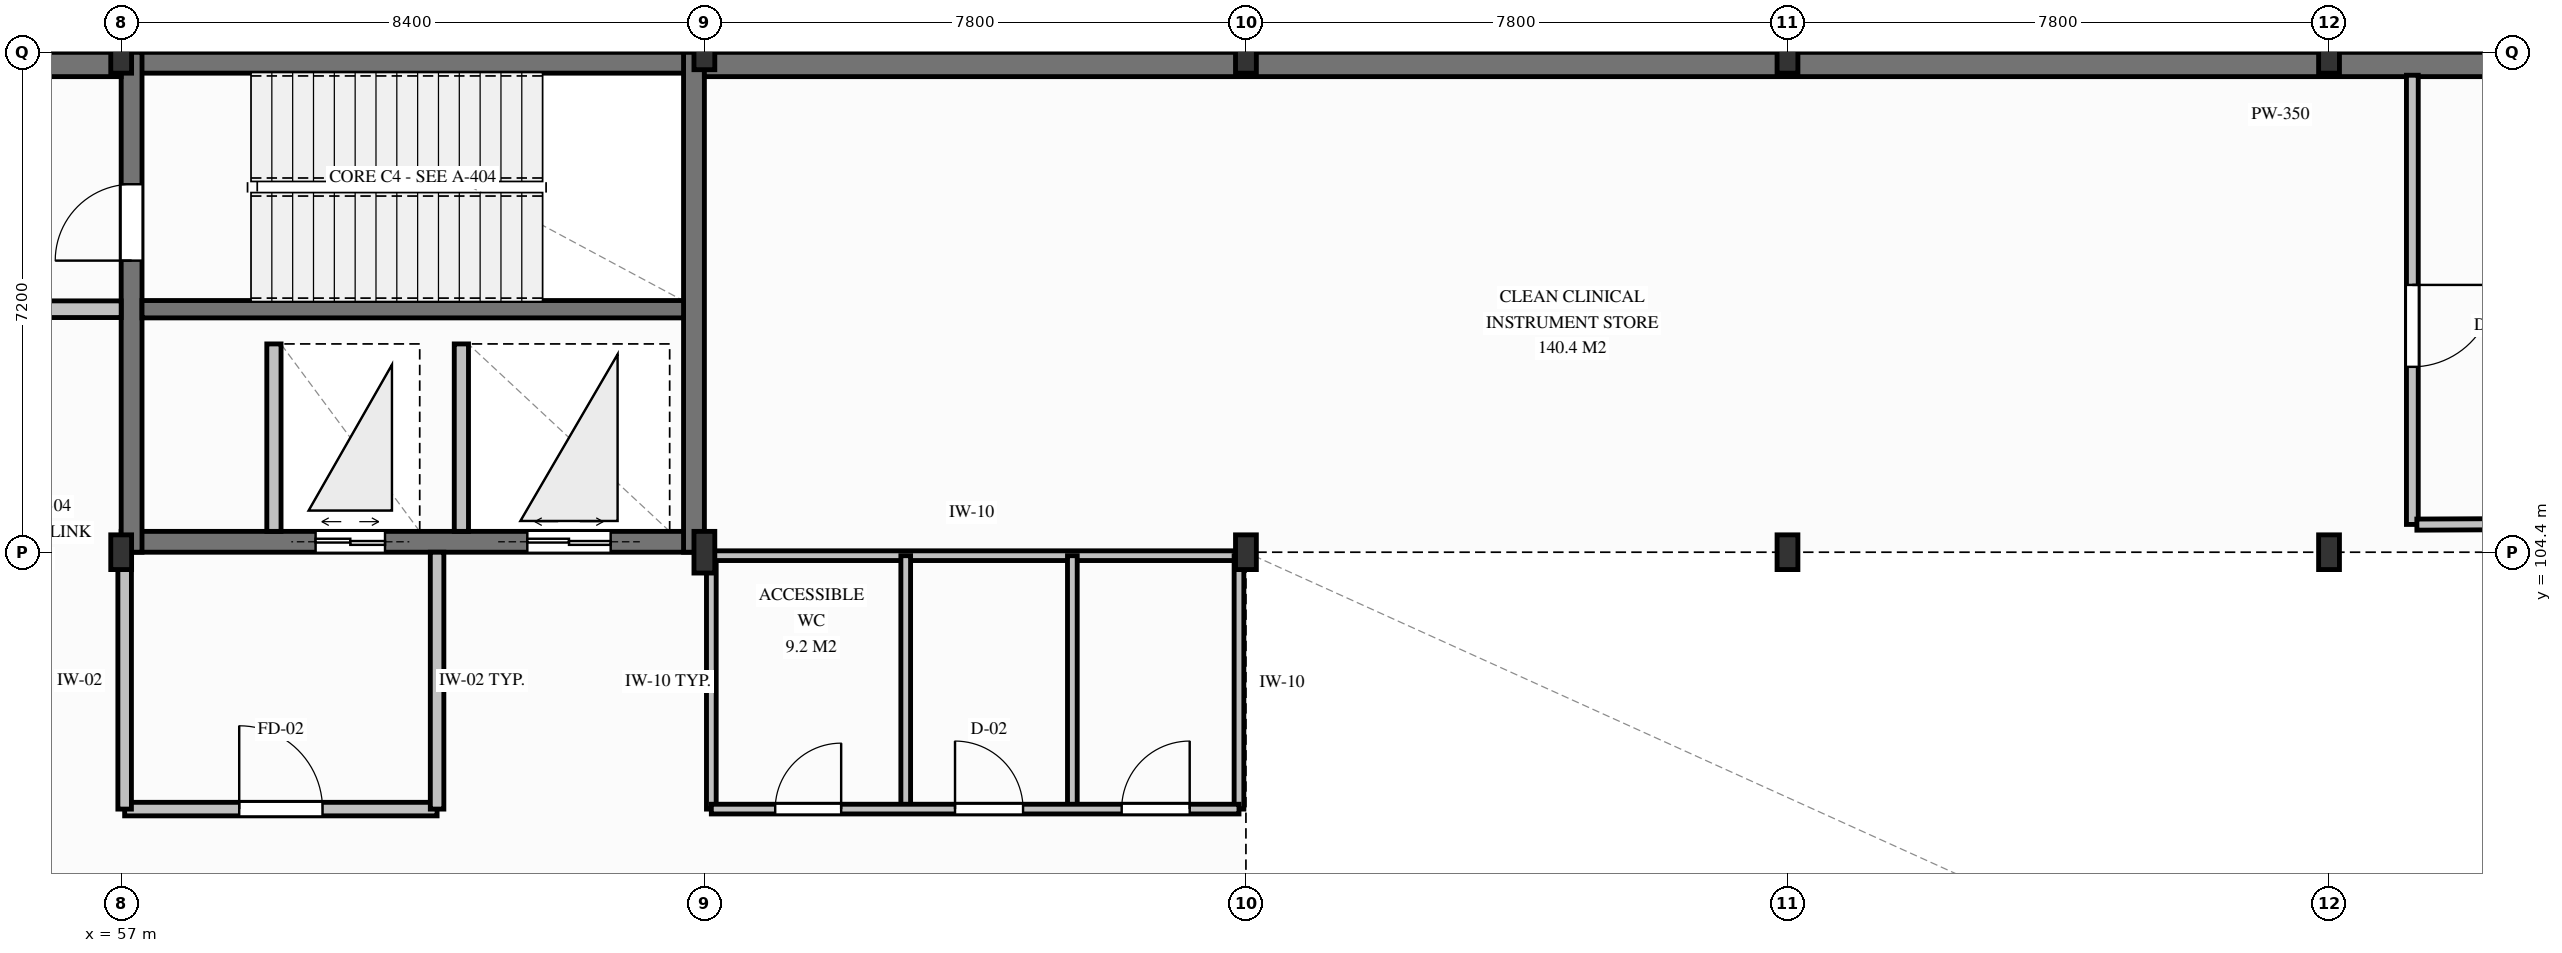
"""IFC4 building model, lengths in metres.
Left out: names, types, materials, properties, quantities, classifications, styles, units other than length and angle.
Written with IfcOpenShell. Run it as: python <this file> out.ifc"""

import sys

from ifc_helpers import new_model, si_unit, direction, frame, frame_2d, origin, origin_2d, place, context, subcontext, project, spatial, rectangle, i_section, extrude, element, fill, save


model = new_model("IFC4")
c1 = context("Model", 3, precision=1e-05, world=origin(), true_north=direction((0.0, 1.0)))
c2 = subcontext(c1, "Body", "Model", "MODEL_VIEW")
j1 = project(units=[si_unit("LENGTHUNIT", "METRE"), si_unit("PLANEANGLEUNIT", "RADIAN")], contexts=[c1])
p1 = place(None, origin())
s1 = spatial("IfcSite", under=j1, at=p1, CompositionType="ELEMENT")
p2 = place(p1, origin())
s2 = spatial("IfcBuilding", under=s1, at=p2, CompositionType="ELEMENT")
p3 = place(p2, origin())
s3 = spatial("IfcBuildingStorey", under=s2, at=p3, CompositionType="ELEMENT", Elevation=0.0)
p4 = place(p3, frame((57.0, 111.45, 0.0), z_axis=(0.0, 0.0, 1.0), x_axis=(1.0, 0.0, 0.0)))
e1 = element("IfcWall", 1, at=p4, inside=s3, PredefinedType="SHEAR", context=c2, shape_type="SweptSolid", body=[
    extrude(rectangle(XDim=8.4, YDim=0.3, at=frame_2d((4.2, 0.0))), origin(), (0.0, 0.0, 1.0), 4.5),
])
p5 = place(p3, frame((57.0, 104.55, 0.0), z_axis=(0.0, 0.0, 1.0), x_axis=(1.0, 0.0, 0.0)))
e2 = element("IfcWall", 2, at=p5, inside=s3, PredefinedType="SHEAR", context=c2, shape_type="SweptSolid", body=[
    extrude(rectangle(XDim=8.4, YDim=0.3, at=frame_2d((4.2, 0.0))), origin(), (0.0, 0.0, 1.0), 4.5),
])
p6 = place(p5, frame((2.8, 0.0, 0.0)))
e3 = element("IfcOpeningElement", 3, at=p6, cuts=e2, PredefinedType="OPENING", context=c2, shape_type="SweptSolid", body=[
    extrude(rectangle(XDim=1.0, YDim=2.1, at=frame_2d((0.5, 1.05))), frame((0.0, 0.16, 0.0), z_axis=(0.0, -1.0, 0.0), x_axis=(1.0, 0.0, 0.0)), (0.0, 0.0, 1.0), 0.32),
])
p7 = place(p5, frame((5.85, 0.0, 0.0)))
e4 = element("IfcOpeningElement", 4, at=p7, cuts=e2, PredefinedType="OPENING", context=c2, shape_type="SweptSolid", body=[
    extrude(rectangle(XDim=1.2, YDim=2.15, at=frame_2d((0.6, 1.075))), frame((0.0, 0.16, 0.0), z_axis=(0.0, -1.0, 0.0), x_axis=(1.0, 0.0, 0.0)), (0.0, 0.0, 1.0), 0.32),
])
p8 = place(p3, frame((57.15, 104.4, 0.0), z_axis=(0.0, 0.0, 1.0), x_axis=(0.0, 1.0, 0.0)))
e5 = element("IfcWall", 5, at=p8, inside=s3, PredefinedType="SHEAR", context=c2, shape_type="SweptSolid", body=[
    extrude(rectangle(XDim=7.2, YDim=0.3, at=frame_2d((3.6, 0.0))), origin(), (0.0, 0.0, 1.0), 4.5),
])
p9 = place(p8, frame((4.2, 0.0, 0.0)))
e6 = element("IfcOpeningElement", 6, at=p9, cuts=e5, PredefinedType="OPENING", context=c2, shape_type="SweptSolid", body=[
    extrude(rectangle(XDim=1.1, YDim=2.15, at=frame_2d((0.55, 1.075))), frame((0.0, 0.16, 0.0), z_axis=(0.0, -1.0, 0.0), x_axis=(1.0, 0.0, 0.0)), (0.0, 0.0, 1.0), 0.32),
])
p10 = place(p3, frame((65.25, 104.4, 0.0), z_axis=(0.0, 0.0, 1.0), x_axis=(0.0, 1.0, 0.0)))
e7 = element("IfcWall", 7, at=p10, inside=s3, PredefinedType="SHEAR", context=c2, shape_type="SweptSolid", body=[
    extrude(rectangle(XDim=7.2, YDim=0.3, at=frame_2d((3.6, 0.0))), origin(), (0.0, 0.0, 1.0), 4.5),
])
p11 = place(p3, frame((57.3, 107.9, 0.0), z_axis=(0.0, 0.0, 1.0), x_axis=(1.0, 0.0, 0.0)))
e8 = element("IfcWall", 8, at=p11, inside=s3, PredefinedType="SHEAR", context=c2, shape_type="SweptSolid", body=[
    extrude(rectangle(XDim=7.8, YDim=0.25, at=frame_2d((3.9, 0.0))), origin(), (0.0, 0.0, 1.0), 4.5),
])
p12 = place(p3, frame((49.2, 111.425, 0.0), z_axis=(0.0, 0.0, 1.0), x_axis=(1.0, 0.0, 0.0)))
e9 = element("IfcWall", 9, at=p12, inside=s3, PredefinedType="SHEAR", context=c2, shape_type="SweptSolid", body=[
    extrude(rectangle(XDim=7.8, YDim=0.35, at=frame_2d((3.9, 0.0))), origin(), (0.0, 0.0, 1.0), 4.5),
])
p13 = place(p3, frame((65.4, 111.425, 0.0), z_axis=(0.0, 0.0, 1.0), x_axis=(1.0, 0.0, 0.0)))
e10 = element("IfcWall", 10, at=p13, inside=s3, PredefinedType="SHEAR", context=c2, shape_type="SweptSolid", body=[
    extrude(rectangle(XDim=48.0, YDim=0.35, at=frame_2d((24.0, 0.0))), origin(), (0.0, 0.0, 1.0), 4.5),
])
p14 = place(p3, frame((57.0, 104.4, 0.0), z_axis=(0.0, 0.0, 1.0), x_axis=(1.0, 0.0, 0.0)))
e11 = element("IfcColumn", 11, at=p14, inside=s3, PredefinedType="COLUMN", context=c2, shape_type="SweptSolid", body=[
    extrude(i_section(OverallWidth=0.3, OverallDepth=0.5, WebThickness=0.014, FlangeThickness=0.028, FilletRadius=0.027, at=origin_2d()), origin(), (0.0, 0.0, 1.0), 4.5),
])
for number, where, z_axis, x_axis in (
    (12, (57.0, 111.6, 0.0), (0.0, 0.0, 1.0), (1.0, 0.0, 0.0)),
    (13, (65.4, 104.4, 0.0), (0.0, 0.0, 1.0), (1.0, 0.0, 0.0)),
):
    element("IfcColumn", number, at=place(p3, frame(where, z_axis=z_axis, x_axis=x_axis)), inside=s3, PredefinedType="COLUMN", context=c2, shape_type="SweptSolid", body=[
        extrude(i_section(OverallWidth=0.3, OverallDepth=0.6, WebThickness=0.015, FlangeThickness=0.03, FilletRadius=0.027, at=origin_2d()), origin(), (0.0, 0.0, 1.0), 4.5),
    ])
for number, where, z_axis, x_axis in (
    (14, (65.4, 111.6, 0.0), (0.0, 0.0, 1.0), (1.0, 0.0, 0.0)),
    (15, (73.2, 104.4, 0.0), (0.0, 0.0, 1.0), (1.0, 0.0, 0.0)),
):
    element("IfcColumn", number, at=place(p3, frame(where, z_axis=z_axis, x_axis=x_axis)), inside=s3, PredefinedType="COLUMN", context=c2, shape_type="SweptSolid", body=[
        extrude(i_section(OverallWidth=0.3, OverallDepth=0.5, WebThickness=0.014, FlangeThickness=0.028, FilletRadius=0.027, at=origin_2d()), origin(), (0.0, 0.0, 1.0), 4.5),
    ])
p15 = place(p3, frame((73.2, 111.6, 0.0), z_axis=(0.0, 0.0, 1.0), x_axis=(1.0, 0.0, 0.0)))
e16 = element("IfcColumn", 16, at=p15, inside=s3, PredefinedType="COLUMN", context=c2, shape_type="SweptSolid", body=[
    extrude(i_section(OverallWidth=0.3, OverallDepth=0.6, WebThickness=0.015, FlangeThickness=0.03, FilletRadius=0.027, at=origin_2d()), origin(), (0.0, 0.0, 1.0), 4.5),
])
p16 = place(p3, frame((81.0, 104.4, 0.0), z_axis=(0.0, 0.0, 1.0), x_axis=(1.0, 0.0, 0.0)))
e17 = element("IfcColumn", 17, at=p16, inside=s3, PredefinedType="COLUMN", context=c2, shape_type="SweptSolid", body=[
    extrude(i_section(OverallWidth=0.3, OverallDepth=0.5, WebThickness=0.014, FlangeThickness=0.028, FilletRadius=0.027, at=origin_2d()), origin(), (0.0, 0.0, 1.0), 4.5),
])
p17 = place(p3, frame((81.0, 111.6, 0.0), z_axis=(0.0, 0.0, 1.0), x_axis=(1.0, 0.0, 0.0)))
e18 = element("IfcColumn", 18, at=p17, inside=s3, PredefinedType="COLUMN", context=c2, shape_type="SweptSolid", body=[
    extrude(i_section(OverallWidth=0.3, OverallDepth=0.6, WebThickness=0.015, FlangeThickness=0.03, FilletRadius=0.027, at=origin_2d()), origin(), (0.0, 0.0, 1.0), 4.5),
])
p18 = place(p3, frame((88.8, 104.4, 0.0), z_axis=(0.0, 0.0, 1.0), x_axis=(1.0, 0.0, 0.0)))
e19 = element("IfcColumn", 19, at=p18, inside=s3, PredefinedType="COLUMN", context=c2, shape_type="SweptSolid", body=[
    extrude(i_section(OverallWidth=0.3, OverallDepth=0.5, WebThickness=0.014, FlangeThickness=0.028, FilletRadius=0.027, at=origin_2d()), origin(), (0.0, 0.0, 1.0), 4.5),
])
p19 = place(p3, frame((88.8, 111.6, 0.0), z_axis=(0.0, 0.0, 1.0), x_axis=(1.0, 0.0, 0.0)))
e20 = element("IfcColumn", 20, at=p19, inside=s3, PredefinedType="COLUMN", context=c2, shape_type="SweptSolid", body=[
    extrude(i_section(OverallWidth=0.3, OverallDepth=0.6, WebThickness=0.015, FlangeThickness=0.03, FilletRadius=0.027, at=origin_2d()), origin(), (0.0, 0.0, 1.0), 4.5),
])
for number, where, z_axis, x_axis in (
    (21, (59.2, 104.7, 0.0), (0.0, 0.0, 1.0), (0.0, 1.0, 0.0)),
    (22, (61.9, 104.7, 0.0), (0.0, 0.0, 1.0), (0.0, 1.0, 0.0)),
):
    element("IfcWall", number, at=place(p3, frame(where, z_axis=z_axis, x_axis=x_axis)), inside=s3, PredefinedType="PARTITIONING", context=c2, shape_type="SweptSolid", body=[
        extrude(rectangle(XDim=2.7, YDim=0.205, at=frame_2d((1.35, 0.0))), origin(), (0.0, 0.0, 1.0), 4.23),
    ])
p20 = place(p3, frame((65.5, 100.7, 0.0), z_axis=(0.0, 0.0, 1.0), x_axis=(0.0, 1.0, 0.0)))
e23 = element("IfcWall", 23, at=p20, inside=s3, PredefinedType="PARTITIONING", context=c2, shape_type="SweptSolid", body=[
    extrude(rectangle(XDim=3.68, YDim=0.14, at=frame_2d((1.84, 0.0))), origin(), (0.0, 0.0, 1.0), 3.728),
])
p21 = place(p3, frame((65.4, 104.35, 0.0), z_axis=(0.0, 0.0, 1.0), x_axis=(1.0, 0.0, 0.0)))
e24 = element("IfcWall", 24, at=p21, inside=s3, PredefinedType="PARTITIONING", context=c2, shape_type="SweptSolid", body=[
    extrude(rectangle(XDim=7.7, YDim=0.14, at=frame_2d((3.85, 0.0))), origin(), (0.0, 0.0, 1.0), 3.628),
])
p22 = place(p3, frame((73.1, 100.7, 0.0), z_axis=(0.0, 0.0, 1.0), x_axis=(0.0, 1.0, 0.0)))
e25 = element("IfcWall", 25, at=p22, inside=s3, PredefinedType="PARTITIONING", context=c2, shape_type="SweptSolid", body=[
    extrude(rectangle(XDim=3.65, YDim=0.14, at=frame_2d((1.825, 0.0))), origin(), (0.0, 0.0, 1.0), 3.628),
])
for number, where, z_axis, x_axis in (
    (26, (68.3, 100.7, 0.0), (0.0, 0.0, 1.0), (0.0, 1.0, 0.0)),
    (27, (70.7, 100.7, 0.0), (0.0, 0.0, 1.0), (0.0, 1.0, 0.0)),
):
    element("IfcWall", number, at=place(p3, frame(where, z_axis=z_axis, x_axis=x_axis)), inside=s3, PredefinedType="PARTITIONING", context=c2, shape_type="SweptSolid", body=[
        extrude(rectangle(XDim=3.65, YDim=0.14, at=frame_2d((1.825, 0.0))), origin(), (0.0, 0.0, 1.0), 3.728),
    ])
p23 = place(p3, frame((65.5, 100.7, 0.0), z_axis=(0.0, 0.0, 1.0), x_axis=(1.0, 0.0, 0.0)))
e28 = element("IfcWall", 28, at=p23, inside=s3, PredefinedType="PARTITIONING", context=c2, shape_type="SweptSolid", body=[
    extrude(rectangle(XDim=7.6, YDim=0.14, at=frame_2d((3.8, 0.0))), origin(), (0.0, 0.0, 1.0), 3.628),
])
p24 = place(p23, frame((0.92, 0.0, 0.0)))
e29 = element("IfcOpeningElement", 29, at=p24, cuts=e28, PredefinedType="OPENING", context=c2, shape_type="SweptSolid", body=[
    extrude(rectangle(XDim=0.95, YDim=2.12, at=frame_2d((0.475, 1.06))), frame((0.0, 0.08, 0.0), z_axis=(0.0, -1.0, 0.0), x_axis=(1.0, 0.0, 0.0)), (0.0, 0.0, 1.0), 0.16),
])
p25 = place(p23, frame((3.51, 0.0, 0.0)))
e30 = element("IfcOpeningElement", 30, at=p25, cuts=e28, PredefinedType="OPENING", context=c2, shape_type="SweptSolid", body=[
    extrude(rectangle(XDim=0.98, YDim=2.14, at=frame_2d((0.49, 1.07))), frame((0.0, 0.08, 0.0), z_axis=(0.0, -1.0, 0.0), x_axis=(1.0, 0.0, 0.0)), (0.0, 0.0, 1.0), 0.16),
])
p26 = place(p23, frame((5.91, 0.0, 0.0)))
e31 = element("IfcOpeningElement", 31, at=p26, cuts=e28, PredefinedType="OPENING", context=c2, shape_type="SweptSolid", body=[
    extrude(rectangle(XDim=0.98, YDim=2.14, at=frame_2d((0.49, 1.07))), frame((0.0, 0.08, 0.0), z_axis=(0.0, -1.0, 0.0), x_axis=(1.0, 0.0, 0.0)), (0.0, 0.0, 1.0), 0.16),
])
p27 = place(p3, frame((57.05, 100.7, 0.0), z_axis=(0.0, 0.0, 1.0), x_axis=(1.0, 0.0, 0.0)))
e32 = element("IfcWall", 32, at=p27, inside=s3, PredefinedType="PARTITIONING", context=c2, shape_type="SweptSolid", body=[
    extrude(rectangle(XDim=4.5, YDim=0.195, at=frame_2d((2.25, 0.0))), origin(), (0.0, 0.0, 1.0), 3.628),
])
p28 = place(p27, frame((1.65, 0.0, 0.0)))
e33 = element("IfcOpeningElement", 33, at=p28, cuts=e32, PredefinedType="OPENING", context=c2, shape_type="SweptSolid", body=[
    extrude(rectangle(XDim=1.2, YDim=2.15, at=frame_2d((0.6, 1.075))), frame((0.0, 0.107, 0.0), z_axis=(0.0, -1.0, 0.0), x_axis=(1.0, 0.0, 0.0)), (0.0, 0.0, 1.0), 0.215),
])
p29 = place(p3, frame((61.55, 100.7, 0.0), z_axis=(0.0, 0.0, 1.0), x_axis=(0.0, 1.0, 0.0)))
e34 = element("IfcWall", 34, at=p29, inside=s3, PredefinedType="PARTITIONING", context=c2, shape_type="SweptSolid", body=[
    extrude(rectangle(XDim=3.7, YDim=0.195, at=frame_2d((1.85, 0.0))), origin(), (0.0, 0.0, 1.0), 3.928),
])
p30 = place(p3, frame((57.05, 100.7, 0.0), z_axis=(0.0, 0.0, 1.0), x_axis=(0.0, 1.0, 0.0)))
e35 = element("IfcWall", 35, at=p30, inside=s3, PredefinedType="PARTITIONING", context=c2, shape_type="SweptSolid", body=[
    extrude(rectangle(XDim=3.7, YDim=0.195, at=frame_2d((1.85, 0.0))), origin(), (0.0, 0.0, 1.0), 3.628),
])
p31 = place(p3, frame((49.4, 107.9, 0.0), z_axis=(0.0, 0.0, 1.0), x_axis=(1.0, 0.0, 0.0)))
e36 = element("IfcWall", 36, at=p31, inside=s3, PredefinedType="PARTITIONING", context=c2, shape_type="SweptSolid", body=[
    extrude(rectangle(XDim=7.6, YDim=0.24, at=frame_2d((3.8, 0.0))), origin(), (0.0, 0.0, 1.0), 3.778),
])
p32 = place(p31, frame((3.2, 0.0, 0.0)))
e37 = element("IfcOpeningElement", 37, at=p32, cuts=e36, PredefinedType="OPENING", context=c2, shape_type="SweptSolid", body=[
    extrude(rectangle(XDim=1.1, YDim=2.15, at=frame_2d((0.55, 1.075))), frame((0.0, 0.13, 0.0), z_axis=(0.0, -1.0, 0.0), x_axis=(1.0, 0.0, 0.0)), (0.0, 0.0, 1.0), 0.26),
])
p33 = place(p3, frame((90.0, 111.27, 0.0), z_axis=(0.0, 0.0, 1.0), x_axis=(0.0, -1.0, 0.0)))
e38 = element("IfcWall", 38, at=p33, inside=s3, PredefinedType="PARTITIONING", context=c2, shape_type="SweptSolid", body=[
    extrude(rectangle(XDim=6.47, YDim=0.17, at=frame_2d((3.235, 0.0))), origin(), (0.0, 0.0, 1.0), 3.928),
])
p34 = place(p33, frame((3.02, 0.0, 0.0)))
e39 = element("IfcOpeningElement", 39, at=p34, cuts=e38, PredefinedType="OPENING", context=c2, shape_type="SweptSolid", body=[
    extrude(rectangle(XDim=1.18, YDim=2.2, at=frame_2d((0.59, 1.1))), frame((0.0, 0.095, 0.0), z_axis=(0.0, -1.0, 0.0), x_axis=(1.0, 0.0, 0.0)), (0.0, 0.0, 1.0), 0.19),
])
p35 = place(p3, frame((105.38, 104.87, 0.0), z_axis=(0.0, 0.0, 1.0), x_axis=(-0.99998879208, -0.004734523693, 0.0)))
e40 = element("IfcWall", 40, at=p35, inside=s3, PredefinedType="PARTITIONING", context=c2, shape_type="SweptSolid", body=[
    extrude(rectangle(XDim=15.315, YDim=0.16, at=frame_2d((7.658, 0.0))), origin(), (0.0, 0.0, 1.0), 3.628),
])
p36 = place(p9, origin())
e41 = element("IfcDoor", 41, at=p36, inside=s3, OperationType="SINGLE_SWING_LEFT", PredefinedType="DOOR", context=c2, shape_type="SweptSolid", body=[
    extrude(rectangle(XDim=1.1, YDim=2.15, at=frame_2d((0.55, 1.075))), frame((0.0, 0.025, 0.0), z_axis=(0.0, -1.0, 0.0), x_axis=(1.0, 0.0, 0.0)), (0.0, 0.0, 1.0), 0.05),
])
fill(e6, e41)
p37 = place(p6, origin())
e42 = element("IfcDoor", 42, at=p37, inside=s3, OperationType="DOUBLE_DOOR_SLIDING", PredefinedType="DOOR", context=c2, shape_type="SweptSolid", body=[
    extrude(rectangle(XDim=1.0, YDim=2.1, at=frame_2d((0.5, 1.05))), frame((0.0, 0.025, 0.0), z_axis=(0.0, -1.0, 0.0), x_axis=(1.0, 0.0, 0.0)), (0.0, 0.0, 1.0), 0.05),
])
fill(e3, e42)
p38 = place(p7, origin())
e43 = element("IfcDoor", 43, at=p38, inside=s3, OperationType="DOUBLE_DOOR_SLIDING", PredefinedType="DOOR", context=c2, shape_type="SweptSolid", body=[
    extrude(rectangle(XDim=1.2, YDim=2.15, at=frame_2d((0.6, 1.075))), frame((0.0, 0.025, 0.0), z_axis=(0.0, -1.0, 0.0), x_axis=(1.0, 0.0, 0.0)), (0.0, 0.0, 1.0), 0.05),
])
fill(e4, e43)
p39 = place(p24, origin())
e44 = element("IfcDoor", 44, at=p39, inside=s3, OperationType="SINGLE_SWING_RIGHT", PredefinedType="DOOR", context=c2, shape_type="SweptSolid", body=[
    extrude(rectangle(XDim=0.95, YDim=2.12, at=frame_2d((0.475, 1.06))), frame((0.0, 0.025, 0.0), z_axis=(0.0, -1.0, 0.0), x_axis=(1.0, 0.0, 0.0)), (0.0, 0.0, 1.0), 0.05),
])
fill(e29, e44)
p40 = place(p25, origin())
e45 = element("IfcDoor", 45, at=p40, inside=s3, OperationType="SINGLE_SWING_LEFT", PredefinedType="DOOR", context=c2, shape_type="SweptSolid", body=[
    extrude(rectangle(XDim=0.98, YDim=2.14, at=frame_2d((0.49, 1.07))), frame((0.0, 0.025, 0.0), z_axis=(0.0, -1.0, 0.0), x_axis=(1.0, 0.0, 0.0)), (0.0, 0.0, 1.0), 0.05),
])
fill(e30, e45)
p41 = place(p26, origin())
e46 = element("IfcDoor", 46, at=p41, inside=s3, OperationType="SINGLE_SWING_RIGHT", PredefinedType="DOOR", context=c2, shape_type="SweptSolid", body=[
    extrude(rectangle(XDim=0.98, YDim=2.14, at=frame_2d((0.49, 1.07))), frame((0.0, 0.025, 0.0), z_axis=(0.0, -1.0, 0.0), x_axis=(1.0, 0.0, 0.0)), (0.0, 0.0, 1.0), 0.05),
])
fill(e31, e46)
p42 = place(p28, origin())
e47 = element("IfcDoor", 47, at=p42, inside=s3, OperationType="SINGLE_SWING_LEFT", PredefinedType="DOOR", context=c2, shape_type="SweptSolid", body=[
    extrude(rectangle(XDim=1.2, YDim=2.15, at=frame_2d((0.6, 1.075))), frame((0.0, 0.025, 0.0), z_axis=(0.0, -1.0, 0.0), x_axis=(1.0, 0.0, 0.0)), (0.0, 0.0, 1.0), 0.05),
])
fill(e33, e47)
p43 = place(p34, origin())
e48 = element("IfcDoor", 48, at=p43, inside=s3, OperationType="SINGLE_SWING_LEFT", PredefinedType="DOOR", context=c2, shape_type="SweptSolid", body=[
    extrude(rectangle(XDim=1.18, YDim=2.2, at=frame_2d((0.59, 1.1))), frame((0.0, 0.025, 0.0), z_axis=(0.0, -1.0, 0.0), x_axis=(1.0, 0.0, 0.0)), (0.0, 0.0, 1.0), 0.05),
])
fill(e39, e48)
save(model, sys.argv[1])
